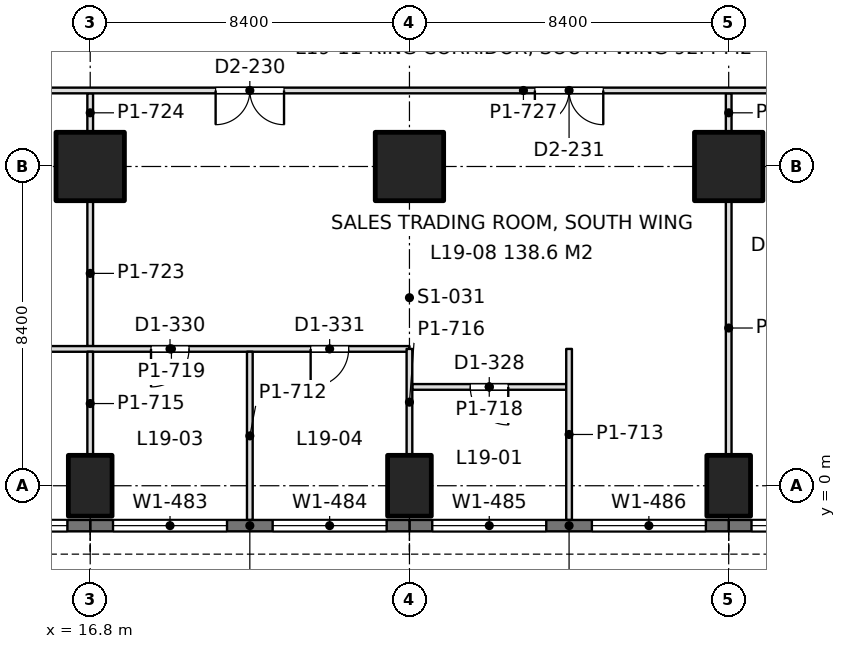
"""IFC4 building model, lengths in metres.
Left out: names, types, materials, properties, quantities, classifications, styles, units other than length and angle.
Written with IfcOpenShell. Run it as: python <this file> out.ifc"""

import sys

from ifc_helpers import new_model, si_unit, direction, frame, frame_2d, origin, origin_2d, place, context, subcontext, project, spatial, rectangle, extrude, element, fill, save


model = new_model("IFC4")
c1 = context("Model", 3, precision=1e-05, world=origin(), true_north=direction((0.0, 1.0)))
c2 = subcontext(c1, "Body", "Model", "MODEL_VIEW")
j1 = project(units=[si_unit("LENGTHUNIT", "METRE"), si_unit("PLANEANGLEUNIT", "RADIAN")], contexts=[c1])
p1 = place(None, origin())
s1 = spatial("IfcSite", under=j1, at=p1, CompositionType="ELEMENT")
p2 = place(p1, origin())
s2 = spatial("IfcBuilding", under=s1, at=p2, CompositionType="ELEMENT")
p3 = place(p2, frame((0.0, 0.0, 86.4)))
s3 = spatial("IfcBuildingStorey", under=s2, at=p3, CompositionType="ELEMENT", Elevation=86.4)
p4 = place(p3, frame((16.8, 0.0, 0.0), z_axis=(0.0, 0.0, 1.0), x_axis=(1.0, 0.0, 0.0)))
e1 = element("IfcColumn", 1, at=p4, inside=s3, PredefinedType="COLUMN", context=c2, shape_type="SweptSolid", body=[
    extrude(rectangle(XDim=1.15, YDim=1.6, at=origin_2d()), origin(), (0.0, 0.0, 1.0), 4.5),
])
p5 = place(p3, frame((16.8, 8.4, 0.0), z_axis=(0.0, 0.0, 1.0), x_axis=(1.0, 0.0, 0.0)))
e2 = element("IfcColumn", 2, at=p5, inside=s3, PredefinedType="COLUMN", context=c2, shape_type="SweptSolid", body=[
    extrude(rectangle(XDim=1.8, YDim=1.8, at=origin_2d()), origin(), (0.0, 0.0, 1.0), 4.5),
])
p6 = place(p3, frame((25.2, 0.0, 0.0), z_axis=(0.0, 0.0, 1.0), x_axis=(1.0, 0.0, 0.0)))
e3 = element("IfcColumn", 3, at=p6, inside=s3, PredefinedType="COLUMN", context=c2, shape_type="SweptSolid", body=[
    extrude(rectangle(XDim=1.15, YDim=1.6, at=origin_2d()), origin(), (0.0, 0.0, 1.0), 4.5),
])
p7 = place(p3, frame((25.2, 8.4, 0.0), z_axis=(0.0, 0.0, 1.0), x_axis=(1.0, 0.0, 0.0)))
e4 = element("IfcColumn", 4, at=p7, inside=s3, PredefinedType="COLUMN", context=c2, shape_type="SweptSolid", body=[
    extrude(rectangle(XDim=1.8, YDim=1.8, at=origin_2d()), origin(), (0.0, 0.0, 1.0), 4.5),
])
p8 = place(p3, frame((33.6, 0.0, 0.0), z_axis=(0.0, 0.0, 1.0), x_axis=(1.0, 0.0, 0.0)))
e5 = element("IfcColumn", 5, at=p8, inside=s3, PredefinedType="COLUMN", context=c2, shape_type="SweptSolid", body=[
    extrude(rectangle(XDim=1.15, YDim=1.6, at=origin_2d()), origin(), (0.0, 0.0, 1.0), 4.5),
])
p9 = place(p3, frame((33.6, 8.4, 0.0), z_axis=(0.0, 0.0, 1.0), x_axis=(1.0, 0.0, 0.0)))
e6 = element("IfcColumn", 6, at=p9, inside=s3, PredefinedType="COLUMN", context=c2, shape_type="SweptSolid", body=[
    extrude(rectangle(XDim=1.8, YDim=1.8, at=origin_2d()), origin(), (0.0, 0.0, 1.0), 4.5),
])
p10 = place(p3, frame((42.0, -1.05, 0.0), z_axis=(0.0, 0.0, 1.0), x_axis=(-1.0, 0.0, 0.0)))
e7 = element("IfcWall", 7, at=p10, inside=s3, PredefinedType="SOLIDWALL", context=c2, shape_type="SweptSolid", body=[
    extrude(rectangle(XDim=8.4, YDim=0.3, at=frame_2d((4.2, 0.0))), origin(), (0.0, 0.0, 1.0), 4.3),
])
p11 = place(p10, frame((0.6, 0.0, 0.9)))
e8 = element("IfcOpeningElement", 8, at=p11, cuts=e7, PredefinedType="OPENING", context=c2, shape_type="SweptSolid", body=[
    extrude(rectangle(XDim=3.0, YDim=1.9, at=frame_2d((1.5, 0.95))), frame((0.0, 0.16, 0.0), z_axis=(0.0, -1.0, 0.0), x_axis=(1.0, 0.0, 0.0)), (0.0, 0.0, 1.0), 0.32),
])
p12 = place(p10, frame((4.8, 0.0, 0.9)))
e9 = element("IfcOpeningElement", 9, at=p12, cuts=e7, PredefinedType="OPENING", context=c2, shape_type="SweptSolid", body=[
    extrude(rectangle(XDim=3.0, YDim=1.9, at=frame_2d((1.5, 0.95))), frame((0.0, 0.16, 0.0), z_axis=(0.0, -1.0, 0.0), x_axis=(1.0, 0.0, 0.0)), (0.0, 0.0, 1.0), 0.32),
])
p13 = place(p3, frame((33.6, -1.05, 0.0), z_axis=(0.0, 0.0, 1.0), x_axis=(-1.0, 0.0, 0.0)))
e10 = element("IfcWall", 10, at=p13, inside=s3, PredefinedType="SOLIDWALL", context=c2, shape_type="SweptSolid", body=[
    extrude(rectangle(XDim=8.4, YDim=0.3, at=frame_2d((4.2, 0.0))), origin(), (0.0, 0.0, 1.0), 4.3),
])
p14 = place(p13, frame((0.6, 0.0, 0.9)))
e11 = element("IfcOpeningElement", 11, at=p14, cuts=e10, PredefinedType="OPENING", context=c2, shape_type="SweptSolid", body=[
    extrude(rectangle(XDim=3.0, YDim=1.9, at=frame_2d((1.5, 0.95))), frame((0.0, 0.16, 0.0), z_axis=(0.0, -1.0, 0.0), x_axis=(1.0, 0.0, 0.0)), (0.0, 0.0, 1.0), 0.32),
])
p15 = place(p13, frame((4.8, 0.0, 0.9)))
e12 = element("IfcOpeningElement", 12, at=p15, cuts=e10, PredefinedType="OPENING", context=c2, shape_type="SweptSolid", body=[
    extrude(rectangle(XDim=3.0, YDim=1.9, at=frame_2d((1.5, 0.95))), frame((0.0, 0.16, 0.0), z_axis=(0.0, -1.0, 0.0), x_axis=(1.0, 0.0, 0.0)), (0.0, 0.0, 1.0), 0.32),
])
p16 = place(p3, frame((25.2, -1.05, 0.0), z_axis=(0.0, 0.0, 1.0), x_axis=(-1.0, 0.0, 0.0)))
e13 = element("IfcWall", 13, at=p16, inside=s3, PredefinedType="SOLIDWALL", context=c2, shape_type="SweptSolid", body=[
    extrude(rectangle(XDim=8.4, YDim=0.3, at=frame_2d((4.2, 0.0))), origin(), (0.0, 0.0, 1.0), 4.3),
])
p17 = place(p16, frame((0.6, 0.0, 0.9)))
e14 = element("IfcOpeningElement", 14, at=p17, cuts=e13, PredefinedType="OPENING", context=c2, shape_type="SweptSolid", body=[
    extrude(rectangle(XDim=3.0, YDim=1.9, at=frame_2d((1.5, 0.95))), frame((0.0, 0.16, 0.0), z_axis=(0.0, -1.0, 0.0), x_axis=(1.0, 0.0, 0.0)), (0.0, 0.0, 1.0), 0.32),
])
p18 = place(p16, frame((4.8, 0.0, 0.9)))
e15 = element("IfcOpeningElement", 15, at=p18, cuts=e13, PredefinedType="OPENING", context=c2, shape_type="SweptSolid", body=[
    extrude(rectangle(XDim=3.0, YDim=1.9, at=frame_2d((1.5, 0.95))), frame((0.0, 0.16, 0.0), z_axis=(0.0, -1.0, 0.0), x_axis=(1.0, 0.0, 0.0)), (0.0, 0.0, 1.0), 0.32),
])
p19 = place(p3, frame((16.8, -1.05, 0.0), z_axis=(0.0, 0.0, 1.0), x_axis=(-1.0, 0.0, 0.0)))
e16 = element("IfcWall", 16, at=p19, inside=s3, PredefinedType="SOLIDWALL", context=c2, shape_type="SweptSolid", body=[
    extrude(rectangle(XDim=8.4, YDim=0.3, at=frame_2d((4.2, 0.0))), origin(), (0.0, 0.0, 1.0), 4.3),
])
p20 = place(p19, frame((0.6, 0.0, 0.9)))
e17 = element("IfcOpeningElement", 17, at=p20, cuts=e16, PredefinedType="OPENING", context=c2, shape_type="SweptSolid", body=[
    extrude(rectangle(XDim=3.0, YDim=1.9, at=frame_2d((1.5, 0.95))), frame((0.0, 0.16, 0.0), z_axis=(0.0, -1.0, 0.0), x_axis=(1.0, 0.0, 0.0)), (0.0, 0.0, 1.0), 0.32),
])
p21 = place(p19, frame((4.8, 0.0, 0.9)))
e18 = element("IfcOpeningElement", 18, at=p21, cuts=e16, PredefinedType="OPENING", context=c2, shape_type="SweptSolid", body=[
    extrude(rectangle(XDim=3.0, YDim=1.9, at=frame_2d((1.5, 0.95))), frame((0.0, 0.16, 0.0), z_axis=(0.0, -1.0, 0.0), x_axis=(1.0, 0.0, 0.0)), (0.0, 0.0, 1.0), 0.32),
])
p22 = place(p3, frame((25.274, 2.6, 0.0), z_axis=(0.0, 0.0, 1.0), x_axis=(1.0, 0.0, 0.0)))
e19 = element("IfcWall", 19, at=p22, inside=s3, PredefinedType="PARTITIONING", context=c2, shape_type="SweptSolid", body=[
    extrude(rectangle(XDim=4.052, YDim=0.15, at=frame_2d((2.026, 0.0))), origin(), (0.0, 0.0, 1.0), 3.6),
])
p23 = place(p22, frame((1.526, 0.0, 0.0)))
e20 = element("IfcOpeningElement", 20, at=p23, cuts=e19, PredefinedType="OPENING", context=c2, shape_type="SweptSolid", body=[
    extrude(rectangle(XDim=1.0, YDim=2.2, at=frame_2d((0.5, 1.1))), frame((0.0, 0.085, 0.0), z_axis=(0.0, -1.0, 0.0), x_axis=(1.0, 0.0, 0.0)), (0.0, 0.0, 1.0), 0.17),
])
p24 = place(p3, frame((12.674, 3.6, 0.0), z_axis=(0.0, 0.0, 1.0), x_axis=(1.0, 0.0, 0.0)))
e21 = element("IfcWall", 21, at=p24, inside=s3, PredefinedType="PARTITIONING", context=c2, shape_type="SweptSolid", body=[
    extrude(rectangle(XDim=12.526, YDim=0.15, at=frame_2d((6.263, 0.0))), origin(), (0.0, 0.0, 1.0), 3.6),
])
p25 = place(p24, frame((1.526, 0.0, 0.0)))
e22 = element("IfcOpeningElement", 22, at=p25, cuts=e21, PredefinedType="OPENING", context=c2, shape_type="SweptSolid", body=[
    extrude(rectangle(XDim=1.0, YDim=2.2, at=frame_2d((0.5, 1.1))), frame((0.0, 0.085, 0.0), z_axis=(0.0, -1.0, 0.0), x_axis=(1.0, 0.0, 0.0)), (0.0, 0.0, 1.0), 0.17),
])
p26 = place(p24, frame((5.726, 0.0, 0.0)))
e23 = element("IfcOpeningElement", 23, at=p26, cuts=e21, PredefinedType="OPENING", context=c2, shape_type="SweptSolid", body=[
    extrude(rectangle(XDim=1.0, YDim=2.2, at=frame_2d((0.5, 1.1))), frame((0.0, 0.085, 0.0), z_axis=(0.0, -1.0, 0.0), x_axis=(1.0, 0.0, 0.0)), (0.0, 0.0, 1.0), 0.17),
])
p27 = place(p24, frame((9.926, 0.0, 0.0)))
e24 = element("IfcOpeningElement", 24, at=p27, cuts=e21, PredefinedType="OPENING", context=c2, shape_type="SweptSolid", body=[
    extrude(rectangle(XDim=1.0, YDim=2.2, at=frame_2d((0.5, 1.1))), frame((0.0, 0.085, 0.0), z_axis=(0.0, -1.0, 0.0), x_axis=(1.0, 0.0, 0.0)), (0.0, 0.0, 1.0), 0.17),
])
p28 = place(p3, frame((16.8, 0.799, 0.0), z_axis=(0.0, 0.0, 1.0), x_axis=(0.0, 1.0, 0.0)))
e25 = element("IfcWall", 25, at=p28, inside=s3, PredefinedType="PARTITIONING", context=c2, shape_type="SweptSolid", body=[
    extrude(rectangle(XDim=2.727, YDim=0.15, at=frame_2d((1.363, 0.0))), origin(), (0.0, 0.0, 1.0), 3.6),
])
p29 = place(p3, frame((21.0, -0.902, 0.0), z_axis=(0.0, 0.0, 1.0), x_axis=(0.0, 1.0, 0.0)))
e26 = element("IfcWall", 26, at=p29, inside=s3, PredefinedType="PARTITIONING", context=c2, shape_type="SweptSolid", body=[
    extrude(rectangle(XDim=4.428, YDim=0.15, at=frame_2d((2.214, 0.0))), origin(), (0.0, 0.0, 1.0), 3.854),
])
p30 = place(p3, frame((25.2, 0.799, 0.0), z_axis=(0.0, 0.0, 1.0), x_axis=(0.0, 1.0, 0.0)))
e27 = element("IfcWall", 27, at=p30, inside=s3, PredefinedType="PARTITIONING", context=c2, shape_type="SweptSolid", body=[
    extrude(rectangle(XDim=2.801, YDim=0.15, at=frame_2d((1.4, 0.0))), origin(), (0.0, 0.0, 1.0), 3.6),
])
p31 = place(p3, frame((29.4, -0.902, 0.0), z_axis=(0.0, 0.0, 1.0), x_axis=(0.0, 1.0, 0.0)))
e28 = element("IfcWall", 28, at=p31, inside=s3, PredefinedType="PARTITIONING", context=c2, shape_type="SweptSolid", body=[
    extrude(rectangle(XDim=4.502, YDim=0.15, at=frame_2d((2.251, 0.0))), origin(), (0.0, 0.0, 1.0), 3.854),
])
p32 = place(p3, frame((16.8, 3.674, 0.0), z_axis=(0.0, 0.0, 1.0), x_axis=(0.0, 1.0, 0.0)))
e29 = element("IfcWall", 29, at=p32, inside=s3, PredefinedType="PARTITIONING", context=c2, shape_type="SweptSolid", body=[
    extrude(rectangle(XDim=3.827, YDim=0.15, at=frame_2d((1.914, 0.0))), origin(), (0.0, 0.0, 1.0), 3.6),
])
p33 = place(p3, frame((16.8, 9.299, 0.0), z_axis=(0.0, 0.0, 1.0), x_axis=(0.0, 1.0, 0.0)))
e30 = element("IfcWall", 30, at=p33, inside=s3, PredefinedType="PARTITIONING", context=c2, shape_type="SweptSolid", body=[
    extrude(rectangle(XDim=1.027, YDim=0.15, at=frame_2d((0.513, 0.0))), origin(), (0.0, 0.0, 1.0), 3.804),
])
p34 = place(p3, frame((33.6, 0.799, 0.0), z_axis=(0.0, 0.0, 1.0), x_axis=(0.0, 1.0, 0.0)))
e31 = element("IfcWall", 31, at=p34, inside=s3, PredefinedType="PARTITIONING", context=c2, shape_type="SweptSolid", body=[
    extrude(rectangle(XDim=6.702, YDim=0.15, at=frame_2d((3.351, 0.0))), origin(), (0.0, 0.0, 1.0), 3.6),
])
p35 = place(p3, frame((33.6, 9.299, 0.0), z_axis=(0.0, 0.0, 1.0), x_axis=(0.0, 1.0, 0.0)))
e32 = element("IfcWall", 32, at=p35, inside=s3, PredefinedType="PARTITIONING", context=c2, shape_type="SweptSolid", body=[
    extrude(rectangle(XDim=1.027, YDim=0.15, at=frame_2d((0.513, 0.0))), origin(), (0.0, 0.0, 1.0), 3.804),
])
p36 = place(p3, frame((7.198, 10.4, 0.0), z_axis=(0.0, 0.0, 1.0), x_axis=(1.0, 0.0, 0.0)))
e33 = element("IfcWall", 33, at=p36, inside=s3, PredefinedType="PARTITIONING", context=c2, shape_type="SweptSolid", body=[
    extrude(rectangle(XDim=42.002, YDim=0.15, at=frame_2d((21.001, 0.0))), origin(), (0.0, 0.0, 1.0), 3.6),
])
p37 = place(p36, frame((4.502, 0.0, 0.0)))
e34 = element("IfcOpeningElement", 34, at=p37, cuts=e33, PredefinedType="OPENING", context=c2, shape_type="SweptSolid", body=[
    extrude(rectangle(XDim=1.8, YDim=2.2, at=frame_2d((0.9, 1.1))), frame((0.0, 0.085, 0.0), z_axis=(0.0, -1.0, 0.0), x_axis=(1.0, 0.0, 0.0)), (0.0, 0.0, 1.0), 0.17),
])
p38 = place(p36, frame((12.902, 0.0, 0.0)))
e35 = element("IfcOpeningElement", 35, at=p38, cuts=e33, PredefinedType="OPENING", context=c2, shape_type="SweptSolid", body=[
    extrude(rectangle(XDim=1.8, YDim=2.2, at=frame_2d((0.9, 1.1))), frame((0.0, 0.085, 0.0), z_axis=(0.0, -1.0, 0.0), x_axis=(1.0, 0.0, 0.0)), (0.0, 0.0, 1.0), 0.17),
])
p39 = place(p36, frame((21.302, 0.0, 0.0)))
e36 = element("IfcOpeningElement", 36, at=p39, cuts=e33, PredefinedType="OPENING", context=c2, shape_type="SweptSolid", body=[
    extrude(rectangle(XDim=1.8, YDim=2.2, at=frame_2d((0.9, 1.1))), frame((0.0, 0.085, 0.0), z_axis=(0.0, -1.0, 0.0), x_axis=(1.0, 0.0, 0.0)), (0.0, 0.0, 1.0), 0.17),
])
p40 = place(p36, frame((29.702, 0.0, 0.0)))
e37 = element("IfcOpeningElement", 37, at=p40, cuts=e33, PredefinedType="OPENING", context=c2, shape_type="SweptSolid", body=[
    extrude(rectangle(XDim=1.8, YDim=2.2, at=frame_2d((0.9, 1.1))), frame((0.0, 0.085, 0.0), z_axis=(0.0, -1.0, 0.0), x_axis=(1.0, 0.0, 0.0)), (0.0, 0.0, 1.0), 0.17),
])
p41 = place(p36, frame((38.102, 0.0, 0.0)))
e38 = element("IfcOpeningElement", 38, at=p41, cuts=e33, PredefinedType="OPENING", context=c2, shape_type="SweptSolid", body=[
    extrude(rectangle(XDim=1.8, YDim=2.2, at=frame_2d((0.9, 1.1))), frame((0.0, 0.085, 0.0), z_axis=(0.0, -1.0, 0.0), x_axis=(1.0, 0.0, 0.0)), (0.0, 0.0, 1.0), 0.17),
])
p42 = place(p12, origin())
e39 = element("IfcWindow", 39, at=p42, inside=s3, PartitioningType="SINGLE_PANEL", PredefinedType="WINDOW", context=c2, shape_type="SweptSolid", body=[
    extrude(rectangle(XDim=3.0, YDim=1.9, at=frame_2d((1.5, 0.95))), frame((0.0, 0.03, 0.0), z_axis=(0.0, -1.0, 0.0), x_axis=(1.0, 0.0, 0.0)), (0.0, 0.0, 1.0), 0.06),
])
fill(e9, e39)
p43 = place(p14, origin())
e40 = element("IfcWindow", 40, at=p43, inside=s3, PartitioningType="SINGLE_PANEL", PredefinedType="WINDOW", context=c2, shape_type="SweptSolid", body=[
    extrude(rectangle(XDim=3.0, YDim=1.9, at=frame_2d((1.5, 0.95))), frame((0.0, 0.03, 0.0), z_axis=(0.0, -1.0, 0.0), x_axis=(1.0, 0.0, 0.0)), (0.0, 0.0, 1.0), 0.06),
])
fill(e11, e40)
p44 = place(p15, origin())
e41 = element("IfcWindow", 41, at=p44, inside=s3, PartitioningType="SINGLE_PANEL", PredefinedType="WINDOW", context=c2, shape_type="SweptSolid", body=[
    extrude(rectangle(XDim=3.0, YDim=1.9, at=frame_2d((1.5, 0.95))), frame((0.0, 0.03, 0.0), z_axis=(0.0, -1.0, 0.0), x_axis=(1.0, 0.0, 0.0)), (0.0, 0.0, 1.0), 0.06),
])
fill(e12, e41)
p45 = place(p17, origin())
e42 = element("IfcWindow", 42, at=p45, inside=s3, PartitioningType="SINGLE_PANEL", PredefinedType="WINDOW", context=c2, shape_type="SweptSolid", body=[
    extrude(rectangle(XDim=3.0, YDim=1.9, at=frame_2d((1.5, 0.95))), frame((0.0, 0.03, 0.0), z_axis=(0.0, -1.0, 0.0), x_axis=(1.0, 0.0, 0.0)), (0.0, 0.0, 1.0), 0.06),
])
fill(e14, e42)
p46 = place(p18, origin())
e43 = element("IfcWindow", 43, at=p46, inside=s3, PartitioningType="SINGLE_PANEL", PredefinedType="WINDOW", context=c2, shape_type="SweptSolid", body=[
    extrude(rectangle(XDim=3.0, YDim=1.9, at=frame_2d((1.5, 0.95))), frame((0.0, 0.03, 0.0), z_axis=(0.0, -1.0, 0.0), x_axis=(1.0, 0.0, 0.0)), (0.0, 0.0, 1.0), 0.06),
])
fill(e15, e43)
p47 = place(p20, origin())
e44 = element("IfcWindow", 44, at=p47, inside=s3, PartitioningType="SINGLE_PANEL", PredefinedType="WINDOW", context=c2, shape_type="SweptSolid", body=[
    extrude(rectangle(XDim=3.0, YDim=1.9, at=frame_2d((1.5, 0.95))), frame((0.0, 0.03, 0.0), z_axis=(0.0, -1.0, 0.0), x_axis=(1.0, 0.0, 0.0)), (0.0, 0.0, 1.0), 0.06),
])
fill(e17, e44)
p48 = place(p23, frame((1.0, 0.0, 0.0), z_axis=(0.0, 0.0, 1.0), x_axis=(-1.0, 0.0, 0.0)))
e45 = element("IfcDoor", 45, at=p48, inside=s3, OperationType="SINGLE_SWING_LEFT", PredefinedType="DOOR", context=c2, shape_type="SweptSolid", body=[
    extrude(rectangle(XDim=1.0, YDim=2.2, at=frame_2d((0.5, 1.1))), frame((0.0, 0.025, 0.0), z_axis=(0.0, -1.0, 0.0), x_axis=(1.0, 0.0, 0.0)), (0.0, 0.0, 1.0), 0.05),
])
fill(e20, e45)
p49 = place(p26, frame((1.0, 0.0, 0.0), z_axis=(0.0, 0.0, 1.0), x_axis=(-1.0, 0.0, 0.0)))
e46 = element("IfcDoor", 46, at=p49, inside=s3, OperationType="SINGLE_SWING_RIGHT", PredefinedType="DOOR", context=c2, shape_type="SweptSolid", body=[
    extrude(rectangle(XDim=1.0, YDim=2.2, at=frame_2d((0.5, 1.1))), frame((0.0, 0.025, 0.0), z_axis=(0.0, -1.0, 0.0), x_axis=(1.0, 0.0, 0.0)), (0.0, 0.0, 1.0), 0.05),
])
fill(e23, e46)
p50 = place(p27, frame((1.0, 0.0, 0.0), z_axis=(0.0, 0.0, 1.0), x_axis=(-1.0, 0.0, 0.0)))
e47 = element("IfcDoor", 47, at=p50, inside=s3, OperationType="SINGLE_SWING_RIGHT", PredefinedType="DOOR", context=c2, shape_type="SweptSolid", body=[
    extrude(rectangle(XDim=1.0, YDim=2.2, at=frame_2d((0.5, 1.1))), frame((0.0, 0.025, 0.0), z_axis=(0.0, -1.0, 0.0), x_axis=(1.0, 0.0, 0.0)), (0.0, 0.0, 1.0), 0.05),
])
fill(e24, e47)
p51 = place(p38, frame((1.8, 0.0, 0.0), z_axis=(0.0, 0.0, 1.0), x_axis=(-1.0, 0.0, 0.0)))
e48 = element("IfcDoor", 48, at=p51, inside=s3, OperationType="DOUBLE_DOOR_SINGLE_SWING", PredefinedType="DOOR", context=c2, shape_type="SweptSolid", body=[
    extrude(rectangle(XDim=1.8, YDim=2.2, at=frame_2d((0.9, 1.1))), frame((0.0, 0.025, 0.0), z_axis=(0.0, -1.0, 0.0), x_axis=(1.0, 0.0, 0.0)), (0.0, 0.0, 1.0), 0.05),
])
fill(e35, e48)
p52 = place(p39, frame((1.8, 0.0, 0.0), z_axis=(0.0, 0.0, 1.0), x_axis=(-1.0, 0.0, 0.0)))
e49 = element("IfcDoor", 49, at=p52, inside=s3, OperationType="DOUBLE_DOOR_SINGLE_SWING", PredefinedType="DOOR", context=c2, shape_type="SweptSolid", body=[
    extrude(rectangle(XDim=1.8, YDim=2.2, at=frame_2d((0.9, 1.1))), frame((0.0, 0.025, 0.0), z_axis=(0.0, -1.0, 0.0), x_axis=(1.0, 0.0, 0.0)), (0.0, 0.0, 1.0), 0.05),
])
fill(e36, e49)
save(model, sys.argv[1])
